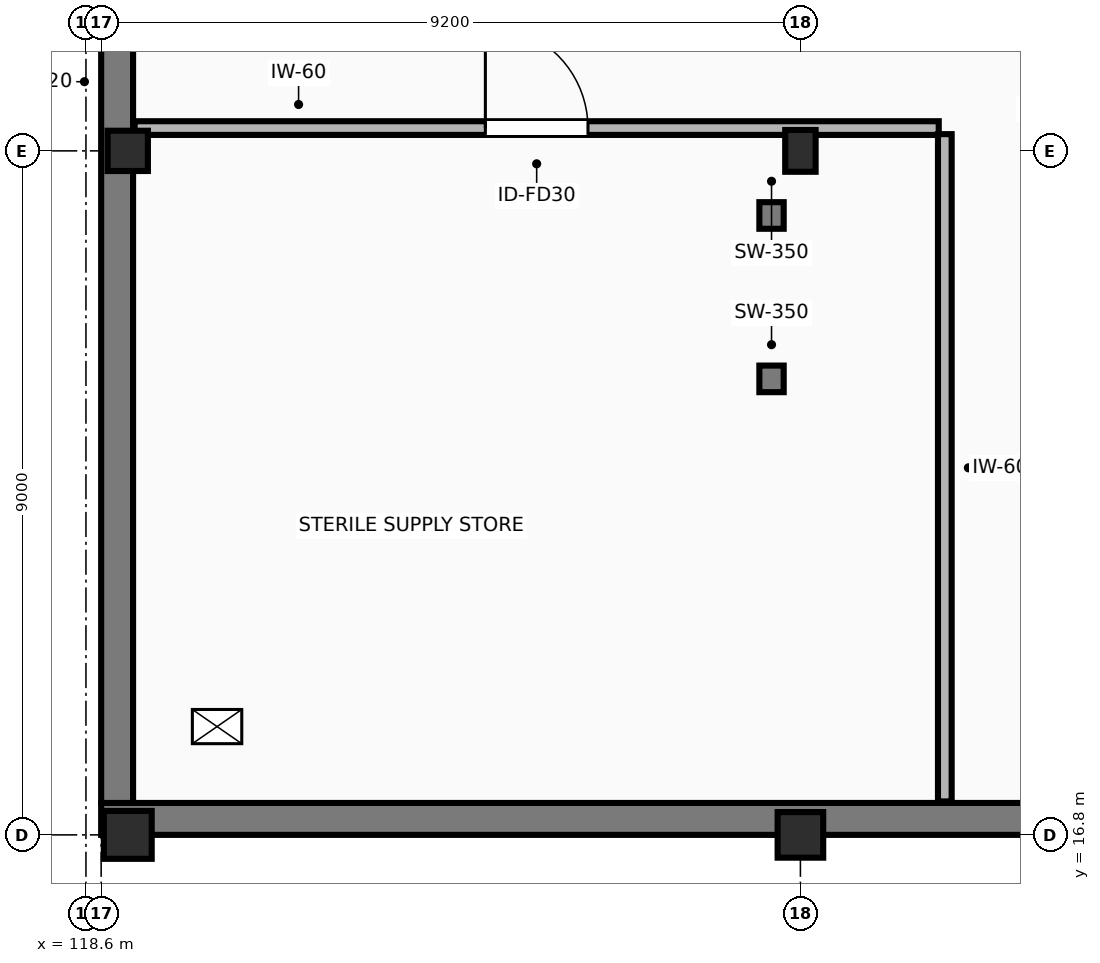
"""IFC4 building model, lengths in metres.
Left out: names, types, materials, properties, quantities, classifications, styles, units other than length and angle.
Written with IfcOpenShell. Run it as: python <this file> out.ifc"""

import sys

from ifc_helpers import new_model, si_unit, direction, frame, frame_2d, origin, origin_2d, place, context, subcontext, project, spatial, rectangle, extrude, element, fill, save


model = new_model("IFC4")
c1 = context("Model", 3, precision=1e-05, world=origin(), true_north=direction((0.0, 1.0)))
c2 = subcontext(c1, "Body", "Model", "MODEL_VIEW")
j1 = project(units=[si_unit("LENGTHUNIT", "METRE"), si_unit("PLANEANGLEUNIT", "RADIAN")], contexts=[c1])
p1 = place(None, origin())
s1 = spatial("IfcSite", under=j1, at=p1, CompositionType="ELEMENT")
p2 = place(p1, origin())
s2 = spatial("IfcBuilding", under=s1, at=p2, CompositionType="ELEMENT")
p3 = place(p2, frame((0.0, 0.0, -4.5)))
s3 = spatial("IfcBuildingStorey", under=s2, at=p3, CompositionType="ELEMENT", Elevation=-4.5)
p4 = place(p3, frame((119.15, 16.8, -0.55), z_axis=(0.0, 0.0, 1.0), x_axis=(1.0, 0.0, 0.0)))
e1 = element("IfcColumn", 1, at=p4, inside=s3, PredefinedType="COLUMN", context=c2, shape_type="SweptSolid", body=[
    extrude(rectangle(XDim=0.63, YDim=0.63, at=origin_2d()), origin(), (0.0, 0.0, 1.0), 5.05),
])
p5 = place(p3, frame((119.15, 25.8, -0.55), z_axis=(0.0, 0.0, 1.0), x_axis=(1.0, 0.0, 0.0)))
e2 = element("IfcColumn", 2, at=p5, inside=s3, PredefinedType="COLUMN", context=c2, shape_type="SweptSolid", body=[
    extrude(rectangle(XDim=0.53, YDim=0.53, at=origin_2d()), origin(), (0.0, 0.0, 1.0), 5.05),
])
p6 = place(p3, frame((128.0, 16.8, -0.55), z_axis=(0.0, 0.0, 1.0), x_axis=(1.0, 0.0, 0.0)))
e3 = element("IfcColumn", 3, at=p6, inside=s3, PredefinedType="COLUMN", context=c2, shape_type="SweptSolid", body=[
    extrude(rectangle(XDim=0.6, YDim=0.6, at=origin_2d()), origin(), (0.0, 0.0, 1.0), 5.05),
])
p7 = place(p3, frame((128.0, 25.8, -0.55), z_axis=(0.0, 0.0, 1.0), x_axis=(1.0, 0.0, 0.0)))
e4 = element("IfcColumn", 4, at=p7, inside=s3, PredefinedType="COLUMN", context=c2, shape_type="SweptSolid", body=[
    extrude(rectangle(XDim=0.4, YDim=0.55, at=origin_2d()), origin(), (0.0, 0.0, 1.0), 5.05),
])
for number, where, z_axis, x_axis in (
    (5, (127.46, 22.8, -0.55), (0.0, 0.0, 1.0), (1.0, 0.0, 0.0)),
    (6, (127.46, 24.95, -0.55), (0.0, 0.0, 1.0), (1.0, 0.0, 0.0)),
):
    element("IfcWall", number, at=place(p3, frame(where, z_axis=z_axis, x_axis=x_axis)), inside=s3, PredefinedType="SHEAR", context=c2, shape_type="SweptSolid", body=[
        extrude(rectangle(XDim=0.32, YDim=0.35, at=frame_2d((0.16, 0.0))), origin(), (0.0, 0.0, 1.0), 5.05),
    ])
p8 = place(p3, frame((118.8, 17.01, 0.0), z_axis=(0.0, 0.0, 1.0), x_axis=(1.0, 0.0, 0.0)))
e7 = element("IfcWall", 7, at=p8, inside=s3, PredefinedType="SHEAR", context=c2, shape_type="SweptSolid", body=[
    extrude(rectangle(XDim=45.9, YDim=0.42, at=frame_2d((22.95, 0.0))), origin(), (0.0, 0.0, 1.0), 4.2),
])
p9 = place(p3, frame((119.01, 17.22, 0.0), z_axis=(0.0, 0.0, 1.0), x_axis=(0.0, 1.0, 0.0)))
e8 = element("IfcWall", 8, at=p9, inside=s3, PredefinedType="SHEAR", context=c2, shape_type="SweptSolid", body=[
    extrude(rectangle(XDim=26.76, YDim=0.42, at=frame_2d((13.38, 0.0))), origin(), (0.0, 0.0, 1.0), 4.2),
])
p10 = place(p3, frame((119.24, 26.1, 0.0), z_axis=(0.0, 0.0, 1.0), x_axis=(1.0, 0.0, 0.0)))
e9 = element("IfcWall", 9, at=p10, inside=s3, PredefinedType="PARTITIONING", context=c2, shape_type="SweptSolid", body=[
    extrude(rectangle(XDim=10.58, YDim=0.18, at=frame_2d((5.29, 0.0))), origin(), (0.0, 0.0, 1.0), 3.535),
])
p11 = place(p10, frame((4.615, 0.0, 0.0)))
e10 = element("IfcOpeningElement", 10, at=p11, cuts=e9, PredefinedType="OPENING", context=c2, shape_type="SweptSolid", body=[
    extrude(rectangle(XDim=1.35, YDim=2.2, at=frame_2d((0.675, 1.1))), frame((0.0, 0.1, 0.0), z_axis=(0.0, -1.0, 0.0), x_axis=(1.0, 0.0, 0.0)), (0.0, 0.0, 1.0), 0.2),
])
p12 = place(p3, frame((129.9, 26.02, 0.0), z_axis=(0.0, 0.0, 1.0), x_axis=(0.0, -1.0, 0.0)))
e11 = element("IfcWall", 11, at=p12, inside=s3, PredefinedType="PARTITIONING", context=c2, shape_type="SweptSolid", body=[
    extrude(rectangle(XDim=8.78, YDim=0.18, at=frame_2d((4.39, 0.0))), origin(), (0.0, 0.0, 1.0), 4.2),
])
p13 = place(p11, origin())
e12 = element("IfcDoor", 12, at=p13, inside=s3, OperationType="SINGLE_SWING_LEFT", PredefinedType="DOOR", context=c2, shape_type="SweptSolid", body=[
    extrude(rectangle(XDim=1.35, YDim=2.2, at=frame_2d((0.675, 1.1))), frame((0.0, 0.025, 0.0), z_axis=(0.0, -1.0, 0.0), x_axis=(1.0, 0.0, 0.0)), (0.0, 0.0, 1.0), 0.05),
])
fill(e10, e12)
save(model, sys.argv[1])
